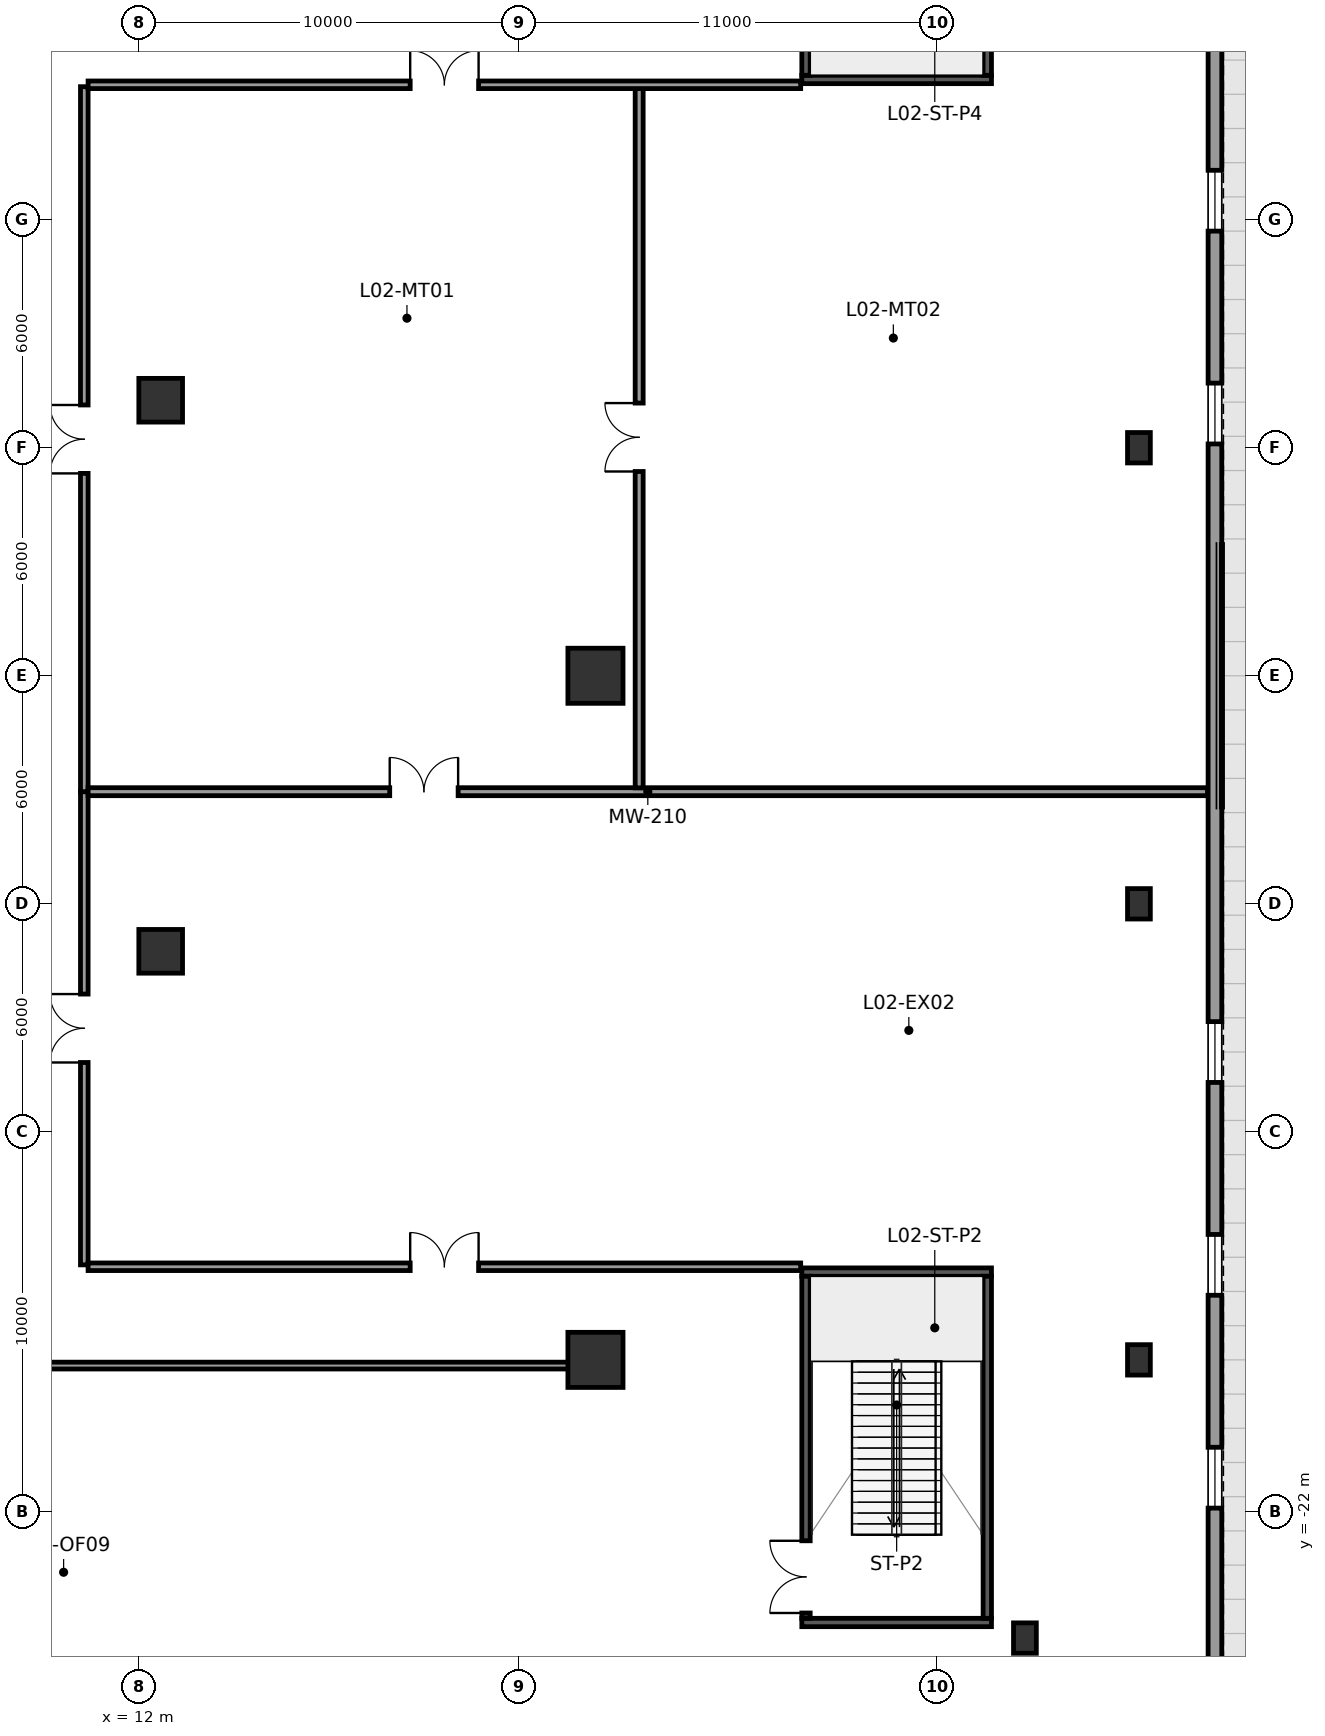
"""IFC4 building model, lengths in metres.
Left out: names, types, materials, properties, quantities, classifications, styles, units other than length and angle.
Written with IfcOpenShell. Run it as: python <this file> out.ifc"""

import sys

from ifc_helpers import new_model, si_unit, direction, frame, frame_2d, origin, origin_2d, place, context, subcontext, project, spatial, rectangle, hollow_rectangle, extrude, element, fill, save


model = new_model("IFC4")
c1 = context("Model", 3, precision=1e-05, world=origin(), true_north=direction((0.0, 1.0)))
c2 = subcontext(c1, "Body", "Model", "MODEL_VIEW")
j1 = project(units=[si_unit("LENGTHUNIT", "METRE"), si_unit("PLANEANGLEUNIT", "RADIAN")], contexts=[c1])
p1 = place(None, origin())
s1 = spatial("IfcSite", under=j1, at=p1, CompositionType="ELEMENT")
p2 = place(p1, origin())
s2 = spatial("IfcBuilding", under=s1, at=p2, CompositionType="ELEMENT")
p3 = place(p2, frame((0.0, 0.0, 11.5)))
s3 = spatial("IfcBuildingStorey", under=s2, at=p3, CompositionType="ELEMENT", Elevation=11.5)
for number, where, z_axis, x_axis in (
    (1, (12.56, -7.25, 0.0), (0.0, 0.0, 1.0), (1.0, 0.0, 0.0)),
    (2, (12.56, 7.25, 0.0), (0.0, 0.0, 1.0), (1.0, 0.0, 0.0)),
):
    element("IfcColumn", number, at=place(p3, frame(where, z_axis=z_axis, x_axis=x_axis)), inside=s3, PredefinedType="COLUMN", context=c2, shape_type="SweptSolid", body=[
        extrude(rectangle(XDim=1.15, YDim=1.15, at=origin_2d()), origin(), (0.0, 0.0, 1.0), 6.0),
    ])
for number, where, z_axis, x_axis in (
    (3, (24.0, -18.0, 0.0), (0.0, 0.0, 1.0), (1.0, 0.0, 0.0)),
    (4, (24.0, 0.0, 0.0), (0.0, 0.0, 1.0), (1.0, 0.0, 0.0)),
):
    element("IfcColumn", number, at=place(p3, frame(where, z_axis=z_axis, x_axis=x_axis)), inside=s3, PredefinedType="COLUMN", context=c2, shape_type="SweptSolid", body=[
        extrude(rectangle(XDim=1.45, YDim=1.45, at=origin_2d()), origin(), (0.0, 0.0, 1.0), 6.0),
    ])
for number, where, z_axis, x_axis in (
    (5, (38.3, -18.0, 0.0), (0.0, 0.0, 1.0), (1.0, 0.0, 0.0)),
    (6, (38.3, -6.0, 0.0), (0.0, 0.0, 1.0), (1.0, 0.0, 0.0)),
    (7, (38.3, 6.0, 0.0), (0.0, 0.0, 1.0), (1.0, 0.0, 0.0)),
    (8, (35.3, -25.32, 0.0), (0.0, 0.0, 1.0), (1.0, 0.0, 0.0)),
):
    element("IfcColumn", number, at=place(p3, frame(where, z_axis=z_axis, x_axis=x_axis)), inside=s3, PredefinedType="COLUMN", context=c2, shape_type="SweptSolid", body=[
        extrude(hollow_rectangle(XDim=0.6, YDim=0.8, WallThickness=0.05, at=origin_2d()), origin(), (0.0, 0.0, 1.0), 6.0),
    ])
p4 = place(p3, frame((40.3, 29.3, 0.0), z_axis=(0.0, 0.0, 1.0), x_axis=(0.0, -1.0, 0.0)))
e9 = element("IfcWall", 9, at=p4, inside=s3, PredefinedType="STANDARD", context=c2, shape_type="SweptSolid", body=[
    extrude(rectangle(XDim=58.6, YDim=0.36, at=frame_2d((29.3, 0.0))), origin(), (0.0, 0.0, 1.0), 5.7),
])
p5 = place(p4, frame((4.8, 0.0, 0.9)))
e10 = element("IfcOpeningElement", 10, at=p5, cuts=e9, PredefinedType="OPENING", context=c2, shape_type="SweptSolid", body=[
    extrude(rectangle(XDim=1.6, YDim=2.6, at=frame_2d((0.8, 1.3))), frame((0.0, 0.19, 0.0), z_axis=(0.0, -1.0, 0.0), x_axis=(1.0, 0.0, 0.0)), (0.0, 0.0, 1.0), 0.38),
])
p6 = place(p4, frame((10.4, 0.0, 0.9)))
e11 = element("IfcOpeningElement", 11, at=p6, cuts=e9, PredefinedType="OPENING", context=c2, shape_type="SweptSolid", body=[
    extrude(rectangle(XDim=1.6, YDim=2.6, at=frame_2d((0.8, 1.3))), frame((0.0, 0.19, 0.0), z_axis=(0.0, -1.0, 0.0), x_axis=(1.0, 0.0, 0.0)), (0.0, 0.0, 1.0), 0.38),
])
p7 = place(p4, frame((16.0, 0.0, 0.9)))
e12 = element("IfcOpeningElement", 12, at=p7, cuts=e9, PredefinedType="OPENING", context=c2, shape_type="SweptSolid", body=[
    extrude(rectangle(XDim=1.6, YDim=2.6, at=frame_2d((0.8, 1.3))), frame((0.0, 0.19, 0.0), z_axis=(0.0, -1.0, 0.0), x_axis=(1.0, 0.0, 0.0)), (0.0, 0.0, 1.0), 0.38),
])
p8 = place(p4, frame((21.6, 0.0, 0.9)))
e13 = element("IfcOpeningElement", 13, at=p8, cuts=e9, PredefinedType="OPENING", context=c2, shape_type="SweptSolid", body=[
    extrude(rectangle(XDim=1.6, YDim=2.6, at=frame_2d((0.8, 1.3))), frame((0.0, 0.19, 0.0), z_axis=(0.0, -1.0, 0.0), x_axis=(1.0, 0.0, 0.0)), (0.0, 0.0, 1.0), 0.38),
])
p9 = place(p4, frame((38.4, 0.0, 0.9)))
e14 = element("IfcOpeningElement", 14, at=p9, cuts=e9, PredefinedType="OPENING", context=c2, shape_type="SweptSolid", body=[
    extrude(rectangle(XDim=1.6, YDim=2.6, at=frame_2d((0.8, 1.3))), frame((0.0, 0.19, 0.0), z_axis=(0.0, -1.0, 0.0), x_axis=(1.0, 0.0, 0.0)), (0.0, 0.0, 1.0), 0.38),
])
p10 = place(p4, frame((44.0, 0.0, 0.9)))
e15 = element("IfcOpeningElement", 15, at=p10, cuts=e9, PredefinedType="OPENING", context=c2, shape_type="SweptSolid", body=[
    extrude(rectangle(XDim=1.6, YDim=2.6, at=frame_2d((0.8, 1.3))), frame((0.0, 0.19, 0.0), z_axis=(0.0, -1.0, 0.0), x_axis=(1.0, 0.0, 0.0)), (0.0, 0.0, 1.0), 0.38),
])
p11 = place(p4, frame((49.6, 0.0, 0.9)))
e16 = element("IfcOpeningElement", 16, at=p11, cuts=e9, PredefinedType="OPENING", context=c2, shape_type="SweptSolid", body=[
    extrude(rectangle(XDim=1.6, YDim=2.6, at=frame_2d((0.8, 1.3))), frame((0.0, 0.19, 0.0), z_axis=(0.0, -1.0, 0.0), x_axis=(1.0, 0.0, 0.0)), (0.0, 0.0, 1.0), 0.38),
])
for number, where, z_axis, x_axis in (
    (17, (29.43, -24.91, 0.0), (0.0, 0.0, 1.0), (1.0, 0.0, 0.0)),
    (18, (29.43, -15.69, 0.0), (0.0, 0.0, 1.0), (1.0, 0.0, 0.0)),
):
    element("IfcWall", number, at=place(p3, frame(where, z_axis=z_axis, x_axis=x_axis)), inside=s3, PredefinedType="SHEAR", context=c2, shape_type="SweptSolid", body=[
        extrude(rectangle(XDim=4.99, YDim=0.22, at=frame_2d((2.495, 0.0))), origin(), (0.0, 0.0, 1.0), 5.7),
    ])
p12 = place(p3, frame((29.54, -24.8, 0.0), z_axis=(0.0, 0.0, 1.0), x_axis=(0.0, 1.0, 0.0)))
e19 = element("IfcWall", 19, at=p12, inside=s3, PredefinedType="SHEAR", context=c2, shape_type="SweptSolid", body=[
    extrude(rectangle(XDim=9.0, YDim=0.22, at=frame_2d((4.5, 0.0))), origin(), (0.0, 0.0, 1.0), 5.7),
])
p13 = place(p12, frame((0.14, 0.0, 0.0)))
e20 = element("IfcOpeningElement", 20, at=p13, cuts=e19, PredefinedType="OPENING", context=c2, shape_type="SweptSolid", body=[
    extrude(rectangle(XDim=1.9, YDim=2.2, at=frame_2d((0.95, 1.1))), frame((0.0, 0.12, 0.0), z_axis=(0.0, -1.0, 0.0), x_axis=(1.0, 0.0, 0.0)), (0.0, 0.0, 1.0), 0.24),
])
p14 = place(p3, frame((34.31, -24.8, 0.0), z_axis=(0.0, 0.0, 1.0), x_axis=(0.0, 1.0, 0.0)))
e21 = element("IfcWall", 21, at=p14, inside=s3, PredefinedType="SHEAR", context=c2, shape_type="SweptSolid", body=[
    extrude(rectangle(XDim=9.0, YDim=0.22, at=frame_2d((4.5, 0.0))), origin(), (0.0, 0.0, 1.0), 5.7),
])
p15 = place(p3, frame((29.43, 15.69, 0.0), z_axis=(0.0, 0.0, 1.0), x_axis=(1.0, 0.0, 0.0)))
e22 = element("IfcWall", 22, at=p15, inside=s3, PredefinedType="SHEAR", context=c2, shape_type="SweptSolid", body=[
    extrude(rectangle(XDim=4.99, YDim=0.22, at=frame_2d((2.495, 0.0))), origin(), (0.0, 0.0, 1.0), 5.7),
])
p16 = place(p3, frame((29.54, 15.8, 0.0), z_axis=(0.0, 0.0, 1.0), x_axis=(0.0, 1.0, 0.0)))
e23 = element("IfcWall", 23, at=p16, inside=s3, PredefinedType="SHEAR", context=c2, shape_type="SweptSolid", body=[
    extrude(rectangle(XDim=9.0, YDim=0.22, at=frame_2d((4.5, 0.0))), origin(), (0.0, 0.0, 1.0), 5.7),
])
p17 = place(p16, frame((6.96, 0.0, 0.0)))
e24 = element("IfcOpeningElement", 24, at=p17, cuts=e23, PredefinedType="OPENING", context=c2, shape_type="SweptSolid", body=[
    extrude(rectangle(XDim=1.9, YDim=2.2, at=frame_2d((0.95, 1.1))), frame((0.0, 0.12, 0.0), z_axis=(0.0, -1.0, 0.0), x_axis=(1.0, 0.0, 0.0)), (0.0, 0.0, 1.0), 0.24),
])
p18 = place(p3, frame((34.31, 15.8, 0.0), z_axis=(0.0, 0.0, 1.0), x_axis=(0.0, 1.0, 0.0)))
e25 = element("IfcWall", 25, at=p18, inside=s3, PredefinedType="SHEAR", context=c2, shape_type="SweptSolid", body=[
    extrude(rectangle(XDim=9.0, YDim=0.22, at=frame_2d((4.5, 0.0))), origin(), (0.0, 0.0, 1.0), 5.7),
])
p19 = place(p3, frame((10.55, -15.5, 0.0), z_axis=(0.0, 0.0, 1.0), x_axis=(0.0, 1.0, 0.0)))
e26 = element("IfcWall", 26, at=p19, inside=s3, PredefinedType="PARTITIONING", context=c2, shape_type="SweptSolid", body=[
    extrude(rectangle(XDim=12.45, YDim=0.2, at=frame_2d((6.225, 0.0))), origin(), (0.0, 0.0, 1.0), 5.7),
])
p20 = place(p19, frame((5.325, 0.0, 0.0)))
e27 = element("IfcOpeningElement", 27, at=p20, cuts=e26, PredefinedType="OPENING", context=c2, shape_type="SweptSolid", body=[
    extrude(rectangle(XDim=1.8, YDim=2.2, at=frame_2d((0.9, 1.1))), frame((0.0, 0.11, 0.0), z_axis=(0.0, -1.0, 0.0), x_axis=(1.0, 0.0, 0.0)), (0.0, 0.0, 1.0), 0.22),
])
p21 = place(p3, frame((10.55, -3.05, 0.0), z_axis=(0.0, 0.0, 1.0), x_axis=(0.0, 1.0, 0.0)))
e28 = element("IfcWall", 28, at=p21, inside=s3, PredefinedType="PARTITIONING", context=c2, shape_type="SweptSolid", body=[
    extrude(rectangle(XDim=18.55, YDim=0.2, at=frame_2d((9.275, 0.0))), origin(), (0.0, 0.0, 1.0), 5.7),
])
p22 = place(p21, frame((8.375, 0.0, 0.0)))
e29 = element("IfcOpeningElement", 29, at=p22, cuts=e28, PredefinedType="OPENING", context=c2, shape_type="SweptSolid", body=[
    extrude(rectangle(XDim=1.8, YDim=2.2, at=frame_2d((0.9, 1.1))), frame((0.0, 0.11, 0.0), z_axis=(0.0, -1.0, 0.0), x_axis=(1.0, 0.0, 0.0)), (0.0, 0.0, 1.0), 0.22),
])
p23 = place(p3, frame((10.65, -3.05, 0.0), z_axis=(0.0, 0.0, 1.0), x_axis=(1.0, 0.0, 0.0)))
e30 = element("IfcWall", 30, at=p23, inside=s3, PredefinedType="MOVABLE", context=c2, shape_type="SweptSolid", body=[
    extrude(rectangle(XDim=29.455, YDim=0.21, at=frame_2d((14.728, 0.0))), origin(), (0.0, 0.0, 1.0), 5.7),
])
p24 = place(p23, frame((7.937, 0.0, 0.0)))
e31 = element("IfcOpeningElement", 31, at=p24, cuts=e30, PredefinedType="OPENING", context=c2, shape_type="SweptSolid", body=[
    extrude(rectangle(XDim=1.8, YDim=2.2, at=frame_2d((0.9, 1.1))), frame((0.0, 0.115, 0.0), z_axis=(0.0, -1.0, 0.0), x_axis=(1.0, 0.0, 0.0)), (0.0, 0.0, 1.0), 0.23),
])
p25 = place(p3, frame((25.15, -2.95, 0.0), z_axis=(0.0, 0.0, 1.0), x_axis=(0.0, 1.0, 0.0)))
e32 = element("IfcWall", 32, at=p25, inside=s3, PredefinedType="MOVABLE", context=c2, shape_type="SweptSolid", body=[
    extrude(rectangle(XDim=18.45, YDim=0.21, at=frame_2d((9.225, 0.0))), origin(), (0.0, 0.0, 1.0), 5.7),
])
p26 = place(p25, frame((8.325, 0.0, 0.0)))
e33 = element("IfcOpeningElement", 33, at=p26, cuts=e32, PredefinedType="OPENING", context=c2, shape_type="SweptSolid", body=[
    extrude(rectangle(XDim=1.8, YDim=2.2, at=frame_2d((0.9, 1.1))), frame((0.0, 0.115, 0.0), z_axis=(0.0, -1.0, 0.0), x_axis=(1.0, 0.0, 0.0)), (0.0, 0.0, 1.0), 0.23),
])
p27 = place(p3, frame((10.65, 15.55, 0.0), z_axis=(0.0, 0.0, 1.0), x_axis=(1.0, 0.0, 0.0)))
e34 = element("IfcWall", 34, at=p27, inside=s3, PredefinedType="PARTITIONING", context=c2, shape_type="SweptSolid", body=[
    extrude(rectangle(XDim=18.75, YDim=0.2, at=frame_2d((9.375, 0.0))), origin(), (0.0, 0.0, 1.0), 5.7),
])
p28 = place(p27, frame((8.475, 0.0, 0.0)))
e35 = element("IfcOpeningElement", 35, at=p28, cuts=e34, PredefinedType="OPENING", context=c2, shape_type="SweptSolid", body=[
    extrude(rectangle(XDim=1.8, YDim=2.2, at=frame_2d((0.9, 1.1))), frame((0.0, 0.11, 0.0), z_axis=(0.0, -1.0, 0.0), x_axis=(1.0, 0.0, 0.0)), (0.0, 0.0, 1.0), 0.22),
])
p29 = place(p3, frame((10.65, -15.55, 0.0), z_axis=(0.0, 0.0, 1.0), x_axis=(1.0, 0.0, 0.0)))
e36 = element("IfcWall", 36, at=p29, inside=s3, PredefinedType="PARTITIONING", context=c2, shape_type="SweptSolid", body=[
    extrude(rectangle(XDim=18.75, YDim=0.2, at=frame_2d((9.375, 0.0))), origin(), (0.0, 0.0, 1.0), 5.7),
])
p30 = place(p29, frame((8.475, 0.0, 0.0)))
e37 = element("IfcOpeningElement", 37, at=p30, cuts=e36, PredefinedType="OPENING", context=c2, shape_type="SweptSolid", body=[
    extrude(rectangle(XDim=1.8, YDim=2.2, at=frame_2d((0.9, 1.1))), frame((0.0, 0.11, 0.0), z_axis=(0.0, -1.0, 0.0), x_axis=(1.0, 0.0, 0.0)), (0.0, 0.0, 1.0), 0.22),
])
p31 = place(p3, frame((-23.6, -18.15, 0.0), z_axis=(0.0, 0.0, 1.0), x_axis=(1.0, 0.0, 0.0)))
e38 = element("IfcWall", 38, at=p31, inside=s3, PredefinedType="PARTITIONING", context=c2, shape_type="SweptSolid", body=[
    extrude(rectangle(XDim=47.2, YDim=0.18, at=frame_2d((23.6, 0.0))), origin(), (0.0, 0.0, 1.0), 3.88),
])
p32 = place(p31, frame((13.26, 0.0, 0.0)))
e39 = element("IfcOpeningElement", 39, at=p32, cuts=e38, PredefinedType="OPENING", context=c2, shape_type="SweptSolid", body=[
    extrude(rectangle(XDim=1.8, YDim=2.2, at=frame_2d((0.9, 1.1))), frame((0.0, 0.1, 0.0), z_axis=(0.0, -1.0, 0.0), x_axis=(1.0, 0.0, 0.0)), (0.0, 0.0, 1.0), 0.2),
])
p33 = place(p7, origin())
e40 = element("IfcWindow", 40, at=p33, inside=s3, PartitioningType="DOUBLE_PANEL_VERTICAL", PredefinedType="WINDOW", context=c2, shape_type="SweptSolid", body=[
    extrude(rectangle(XDim=1.6, YDim=2.6, at=frame_2d((0.8, 1.3))), frame((0.0, 0.03, 0.0), z_axis=(0.0, -1.0, 0.0), x_axis=(1.0, 0.0, 0.0)), (0.0, 0.0, 1.0), 0.06),
])
fill(e12, e40)
p34 = place(p8, origin())
e41 = element("IfcWindow", 41, at=p34, inside=s3, PartitioningType="DOUBLE_PANEL_VERTICAL", PredefinedType="WINDOW", context=c2, shape_type="SweptSolid", body=[
    extrude(rectangle(XDim=1.6, YDim=2.6, at=frame_2d((0.8, 1.3))), frame((0.0, 0.03, 0.0), z_axis=(0.0, -1.0, 0.0), x_axis=(1.0, 0.0, 0.0)), (0.0, 0.0, 1.0), 0.06),
])
fill(e13, e41)
p35 = place(p9, origin())
e42 = element("IfcWindow", 42, at=p35, inside=s3, PartitioningType="DOUBLE_PANEL_VERTICAL", PredefinedType="WINDOW", context=c2, shape_type="SweptSolid", body=[
    extrude(rectangle(XDim=1.6, YDim=2.6, at=frame_2d((0.8, 1.3))), frame((0.0, 0.03, 0.0), z_axis=(0.0, -1.0, 0.0), x_axis=(1.0, 0.0, 0.0)), (0.0, 0.0, 1.0), 0.06),
])
fill(e14, e42)
p36 = place(p10, origin())
e43 = element("IfcWindow", 43, at=p36, inside=s3, PartitioningType="DOUBLE_PANEL_VERTICAL", PredefinedType="WINDOW", context=c2, shape_type="SweptSolid", body=[
    extrude(rectangle(XDim=1.6, YDim=2.6, at=frame_2d((0.8, 1.3))), frame((0.0, 0.03, 0.0), z_axis=(0.0, -1.0, 0.0), x_axis=(1.0, 0.0, 0.0)), (0.0, 0.0, 1.0), 0.06),
])
fill(e15, e43)
p37 = place(p11, origin())
e44 = element("IfcWindow", 44, at=p37, inside=s3, PartitioningType="DOUBLE_PANEL_VERTICAL", PredefinedType="WINDOW", context=c2, shape_type="SweptSolid", body=[
    extrude(rectangle(XDim=1.6, YDim=2.6, at=frame_2d((0.8, 1.3))), frame((0.0, 0.03, 0.0), z_axis=(0.0, -1.0, 0.0), x_axis=(1.0, 0.0, 0.0)), (0.0, 0.0, 1.0), 0.06),
])
fill(e16, e44)
p38 = place(p13, origin())
e45 = element("IfcDoor", 45, at=p38, inside=s3, OperationType="DOUBLE_DOOR_SINGLE_SWING", PredefinedType="DOOR", context=c2, shape_type="SweptSolid", body=[
    extrude(rectangle(XDim=1.9, YDim=2.2, at=frame_2d((0.95, 1.1))), frame((0.0, 0.025, 0.0), z_axis=(0.0, -1.0, 0.0), x_axis=(1.0, 0.0, 0.0)), (0.0, 0.0, 1.0), 0.05),
])
fill(e20, e45)
p39 = place(p20, origin())
e46 = element("IfcDoor", 46, at=p39, inside=s3, OperationType="DOUBLE_DOOR_SINGLE_SWING", PredefinedType="DOOR", context=c2, shape_type="SweptSolid", body=[
    extrude(rectangle(XDim=1.8, YDim=2.2, at=frame_2d((0.9, 1.1))), frame((0.0, 0.025, 0.0), z_axis=(0.0, -1.0, 0.0), x_axis=(1.0, 0.0, 0.0)), (0.0, 0.0, 1.0), 0.05),
])
fill(e27, e46)
p40 = place(p22, origin())
e47 = element("IfcDoor", 47, at=p40, inside=s3, OperationType="DOUBLE_DOOR_SINGLE_SWING", PredefinedType="DOOR", context=c2, shape_type="SweptSolid", body=[
    extrude(rectangle(XDim=1.8, YDim=2.2, at=frame_2d((0.9, 1.1))), frame((0.0, 0.025, 0.0), z_axis=(0.0, -1.0, 0.0), x_axis=(1.0, 0.0, 0.0)), (0.0, 0.0, 1.0), 0.05),
])
fill(e29, e47)
p41 = place(p24, origin())
e48 = element("IfcDoor", 48, at=p41, inside=s3, OperationType="DOUBLE_DOOR_SINGLE_SWING", PredefinedType="DOOR", context=c2, shape_type="SweptSolid", body=[
    extrude(rectangle(XDim=1.8, YDim=2.2, at=frame_2d((0.9, 1.1))), frame((0.0, 0.025, 0.0), z_axis=(0.0, -1.0, 0.0), x_axis=(1.0, 0.0, 0.0)), (0.0, 0.0, 1.0), 0.05),
])
fill(e31, e48)
p42 = place(p26, origin())
e49 = element("IfcDoor", 49, at=p42, inside=s3, OperationType="DOUBLE_DOOR_SINGLE_SWING", PredefinedType="DOOR", context=c2, shape_type="SweptSolid", body=[
    extrude(rectangle(XDim=1.8, YDim=2.2, at=frame_2d((0.9, 1.1))), frame((0.0, 0.025, 0.0), z_axis=(0.0, -1.0, 0.0), x_axis=(1.0, 0.0, 0.0)), (0.0, 0.0, 1.0), 0.05),
])
fill(e33, e49)
p43 = place(p28, origin())
e50 = element("IfcDoor", 50, at=p43, inside=s3, OperationType="DOUBLE_DOOR_SINGLE_SWING", PredefinedType="DOOR", context=c2, shape_type="SweptSolid", body=[
    extrude(rectangle(XDim=1.8, YDim=2.2, at=frame_2d((0.9, 1.1))), frame((0.0, 0.025, 0.0), z_axis=(0.0, -1.0, 0.0), x_axis=(1.0, 0.0, 0.0)), (0.0, 0.0, 1.0), 0.05),
])
fill(e35, e50)
p44 = place(p30, origin())
e51 = element("IfcDoor", 51, at=p44, inside=s3, OperationType="DOUBLE_DOOR_SINGLE_SWING", PredefinedType="DOOR", context=c2, shape_type="SweptSolid", body=[
    extrude(rectangle(XDim=1.8, YDim=2.2, at=frame_2d((0.9, 1.1))), frame((0.0, 0.025, 0.0), z_axis=(0.0, -1.0, 0.0), x_axis=(1.0, 0.0, 0.0)), (0.0, 0.0, 1.0), 0.05),
])
fill(e37, e51)
save(model, sys.argv[1])
